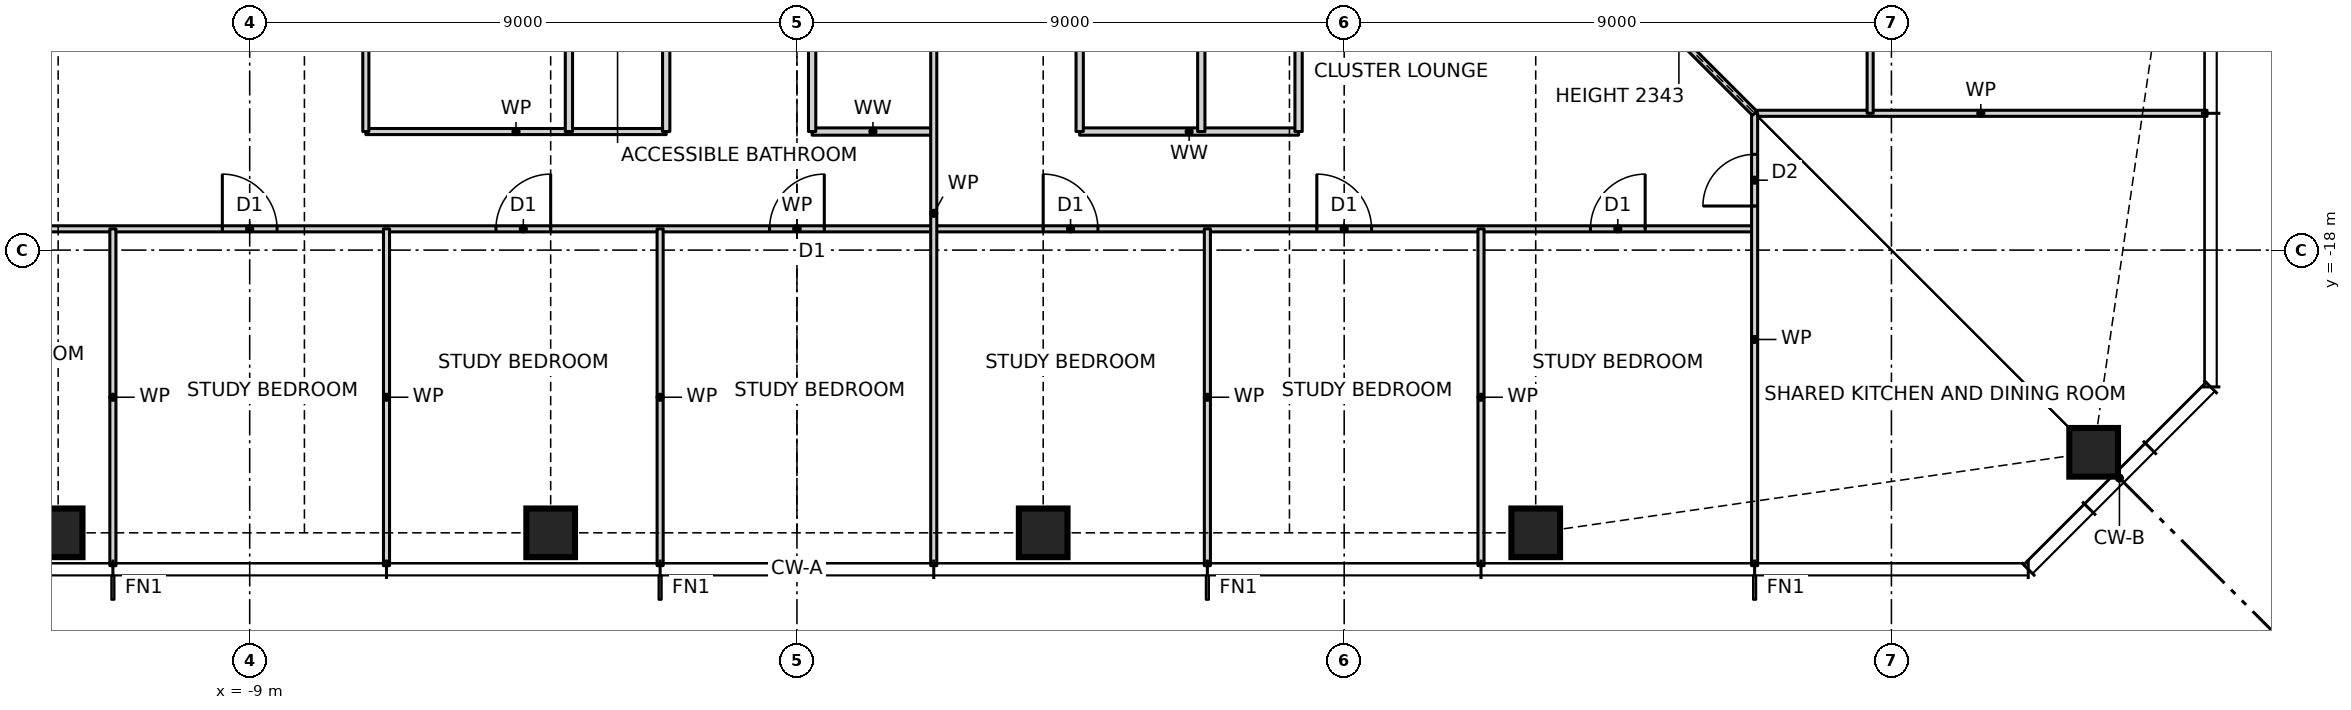
"""IFC4 building model, lengths in metres.
Left out: names, types, materials, properties, quantities, classifications, styles, units other than length and angle.
Written with IfcOpenShell. Run it as: python <this file> out.ifc"""

import sys

from ifc_helpers import new_model, si_unit, direction, frame, frame_2d, origin, origin_2d, place, context, subcontext, project, spatial, rectangle, hollow_rectangle, extrude, element, fill, save


model = new_model("IFC4")
c1 = context("Model", 3, precision=1e-05, world=origin(), true_north=direction((0.0, 1.0)))
c2 = subcontext(c1, "Body", "Model", "MODEL_VIEW")
j1 = project(units=[si_unit("LENGTHUNIT", "METRE"), si_unit("PLANEANGLEUNIT", "RADIAN")], contexts=[c1])
p1 = place(None, origin())
s1 = spatial("IfcSite", under=j1, at=p1, CompositionType="ELEMENT")
p2 = place(p1, origin())
s2 = spatial("IfcBuilding", under=s1, at=p2, CompositionType="ELEMENT")
p3 = place(p2, frame((0.0, 0.0, 64.0)))
s3 = spatial("IfcBuildingStorey", under=s2, at=p3, CompositionType="ELEMENT", Elevation=64.0)
for number, where, z_axis, x_axis in (
    (1, (-12.15, -22.65, 0.0), (0.0, 0.0, 1.0), (1.0, 0.0, 0.0)),
    (2, (-4.05, -22.65, 0.0), (0.0, 0.0, 1.0), (1.0, 0.0, 0.0)),
    (3, (4.05, -22.65, 0.0), (0.0, 0.0, 1.0), (1.0, 0.0, 0.0)),
    (4, (12.15, -22.65, 0.0), (0.0, 0.0, 1.0), (1.0, 0.0, 0.0)),
    (5, (21.326, -21.326, 0.0), (0.0, 0.0, 1.0), (1.0, 0.0, 0.0)),
):
    element("IfcColumn", number, at=place(p3, frame(where, z_axis=z_axis, x_axis=x_axis)), inside=s3, PredefinedType="COLUMN", context=c2, shape_type="SweptSolid", body=[
        extrude(hollow_rectangle(XDim=0.8, YDim=0.8, WallThickness=0.09, at=origin_2d()), origin(), (0.0, 0.0, 1.0), 3.5),
    ])
p4 = place(p3, frame((-15.75, -17.65, 0.0), z_axis=(0.0, 0.0, 1.0), x_axis=(1.0, 0.0, 0.0)))
e6 = element("IfcWall", 6, at=p4, inside=s3, PredefinedType="PARTITIONING", context=c2, shape_type="SweptSolid", body=[
    extrude(rectangle(XDim=31.5, YDim=0.1, at=frame_2d((15.75, 0.0))), origin(), (0.0, 0.0, 1.0), 3.27),
])
p5 = place(p4, frame((1.8, 0.0, 0.0)))
e7 = element("IfcOpeningElement", 7, at=p5, cuts=e6, PredefinedType="OPENING", context=c2, shape_type="SweptSolid", body=[
    extrude(rectangle(XDim=0.9, YDim=2.1, at=frame_2d((0.45, 1.05))), frame((0.0, 0.06, 0.0), z_axis=(0.0, -1.0, 0.0), x_axis=(1.0, 0.0, 0.0)), (0.0, 0.0, 1.0), 0.12),
])
p6 = place(p4, frame((6.3, 0.0, 0.0)))
e8 = element("IfcOpeningElement", 8, at=p6, cuts=e6, PredefinedType="OPENING", context=c2, shape_type="SweptSolid", body=[
    extrude(rectangle(XDim=0.9, YDim=2.1, at=frame_2d((0.45, 1.05))), frame((0.0, 0.06, 0.0), z_axis=(0.0, -1.0, 0.0), x_axis=(1.0, 0.0, 0.0)), (0.0, 0.0, 1.0), 0.12),
])
p7 = place(p4, frame((10.8, 0.0, 0.0)))
e9 = element("IfcOpeningElement", 9, at=p7, cuts=e6, PredefinedType="OPENING", context=c2, shape_type="SweptSolid", body=[
    extrude(rectangle(XDim=0.9, YDim=2.1, at=frame_2d((0.45, 1.05))), frame((0.0, 0.06, 0.0), z_axis=(0.0, -1.0, 0.0), x_axis=(1.0, 0.0, 0.0)), (0.0, 0.0, 1.0), 0.12),
])
p8 = place(p4, frame((15.3, 0.0, 0.0)))
e10 = element("IfcOpeningElement", 10, at=p8, cuts=e6, PredefinedType="OPENING", context=c2, shape_type="SweptSolid", body=[
    extrude(rectangle(XDim=0.9, YDim=2.1, at=frame_2d((0.45, 1.05))), frame((0.0, 0.06, 0.0), z_axis=(0.0, -1.0, 0.0), x_axis=(1.0, 0.0, 0.0)), (0.0, 0.0, 1.0), 0.12),
])
p9 = place(p4, frame((19.8, 0.0, 0.0)))
e11 = element("IfcOpeningElement", 11, at=p9, cuts=e6, PredefinedType="OPENING", context=c2, shape_type="SweptSolid", body=[
    extrude(rectangle(XDim=0.9, YDim=2.1, at=frame_2d((0.45, 1.05))), frame((0.0, 0.06, 0.0), z_axis=(0.0, -1.0, 0.0), x_axis=(1.0, 0.0, 0.0)), (0.0, 0.0, 1.0), 0.12),
])
p10 = place(p4, frame((24.3, 0.0, 0.0)))
e12 = element("IfcOpeningElement", 12, at=p10, cuts=e6, PredefinedType="OPENING", context=c2, shape_type="SweptSolid", body=[
    extrude(rectangle(XDim=0.9, YDim=2.1, at=frame_2d((0.45, 1.05))), frame((0.0, 0.06, 0.0), z_axis=(0.0, -1.0, 0.0), x_axis=(1.0, 0.0, 0.0)), (0.0, 0.0, 1.0), 0.12),
])
p11 = place(p4, frame((28.8, 0.0, 0.0)))
e13 = element("IfcOpeningElement", 13, at=p11, cuts=e6, PredefinedType="OPENING", context=c2, shape_type="SweptSolid", body=[
    extrude(rectangle(XDim=0.9, YDim=2.1, at=frame_2d((0.45, 1.05))), frame((0.0, 0.06, 0.0), z_axis=(0.0, -1.0, 0.0), x_axis=(1.0, 0.0, 0.0)), (0.0, 0.0, 1.0), 0.12),
])
p12 = place(p3, frame((-7.09, -16.05, 0.0), z_axis=(0.0, 0.0, 1.0), x_axis=(1.0, 0.0, 0.0)))
e14 = element("IfcWall", 14, at=p12, inside=s3, PredefinedType="PARTITIONING", context=c2, shape_type="SweptSolid", body=[
    extrude(rectangle(XDim=4.94, YDim=0.1, at=frame_2d((2.47, 0.0))), origin(), (0.0, 0.0, 1.0), 3.27),
])
p13 = place(p3, frame((0.25, -16.05, 0.0), z_axis=(0.0, 0.0, 1.0), x_axis=(1.0, 0.0, 0.0)))
e15 = element("IfcWall", 15, at=p13, inside=s3, PredefinedType="PARTITIONING", context=c2, shape_type="SweptSolid", body=[
    extrude(rectangle(XDim=2.0, YDim=0.12, at=frame_2d((1.0, 0.0))), origin(), (0.0, 0.0, 1.0), 3.27),
])
p14 = place(p3, frame((4.65, -16.05, 0.0), z_axis=(0.0, 0.0, 1.0), x_axis=(1.0, 0.0, 0.0)))
e16 = element("IfcWall", 16, at=p14, inside=s3, PredefinedType="PARTITIONING", context=c2, shape_type="SweptSolid", body=[
    extrude(rectangle(XDim=3.6, YDim=0.12, at=frame_2d((1.8, 0.0))), origin(), (0.0, 0.0, 1.0), 3.27),
])
p15 = place(p3, frame((15.75, -15.75, 0.0), z_axis=(0.0, 0.0, 1.0), x_axis=(1.0, 0.0, 0.0)))
e17 = element("IfcWall", 17, at=p15, inside=s3, PredefinedType="PARTITIONING", context=c2, shape_type="SweptSolid", body=[
    extrude(rectangle(XDim=7.44, YDim=0.1, at=frame_2d((3.72, 0.0))), origin(), (0.0, 0.0, 1.0), 3.27),
])
p16 = place(p3, frame((-15.75, -15.75, 0.0), z_axis=(0.0, 0.0, 1.0), x_axis=(0.707106781187, 0.707106781187, 0.0)))
e18 = element("IfcWall", 18, at=p16, inside=s3, PredefinedType="PARTITIONING", context=c2, shape_type="SweptSolid", body=[
    extrude(rectangle(XDim=5.869, YDim=0.1, at=frame_2d((2.935, 0.0))), origin(), (0.0, 0.0, 1.0), 2.343),
])
p17 = place(p3, frame((17.65, -15.75, 0.0), z_axis=(0.0, 0.0, 1.0), x_axis=(0.0, 1.0, 0.0)))
e19 = element("IfcWall", 19, at=p17, inside=s3, PredefinedType="PARTITIONING", context=c2, shape_type="SweptSolid", body=[
    extrude(rectangle(XDim=27.0, YDim=0.1, at=frame_2d((13.5, 0.0))), origin(), (0.0, 0.0, 1.0), 3.27),
])
p18 = place(p17, frame((1.8, 0.0, 0.0)))
e20 = element("IfcOpeningElement", 20, at=p18, cuts=e19, PredefinedType="OPENING", context=c2, shape_type="SweptSolid", body=[
    extrude(rectangle(XDim=0.9, YDim=2.1, at=frame_2d((0.45, 1.05))), frame((0.0, 0.06, 0.0), z_axis=(0.0, -1.0, 0.0), x_axis=(1.0, 0.0, 0.0)), (0.0, 0.0, 1.0), 0.12),
])
p19 = place(p17, frame((6.3, 0.0, 0.0)))
e21 = element("IfcOpeningElement", 21, at=p19, cuts=e19, PredefinedType="OPENING", context=c2, shape_type="SweptSolid", body=[
    extrude(rectangle(XDim=0.9, YDim=2.1, at=frame_2d((0.45, 1.05))), frame((0.0, 0.06, 0.0), z_axis=(0.0, -1.0, 0.0), x_axis=(1.0, 0.0, 0.0)), (0.0, 0.0, 1.0), 0.12),
])
p20 = place(p17, frame((10.8, 0.0, 0.0)))
e22 = element("IfcOpeningElement", 22, at=p20, cuts=e19, PredefinedType="OPENING", context=c2, shape_type="SweptSolid", body=[
    extrude(rectangle(XDim=0.9, YDim=2.1, at=frame_2d((0.45, 1.05))), frame((0.0, 0.06, 0.0), z_axis=(0.0, -1.0, 0.0), x_axis=(1.0, 0.0, 0.0)), (0.0, 0.0, 1.0), 0.12),
])
p21 = place(p17, frame((15.3, 0.0, 0.0)))
e23 = element("IfcOpeningElement", 23, at=p21, cuts=e19, PredefinedType="OPENING", context=c2, shape_type="SweptSolid", body=[
    extrude(rectangle(XDim=0.9, YDim=2.1, at=frame_2d((0.45, 1.05))), frame((0.0, 0.06, 0.0), z_axis=(0.0, -1.0, 0.0), x_axis=(1.0, 0.0, 0.0)), (0.0, 0.0, 1.0), 0.12),
])
p22 = place(p17, frame((19.8, 0.0, 0.0)))
e24 = element("IfcOpeningElement", 24, at=p22, cuts=e19, PredefinedType="OPENING", context=c2, shape_type="SweptSolid", body=[
    extrude(rectangle(XDim=0.9, YDim=2.1, at=frame_2d((0.45, 1.05))), frame((0.0, 0.06, 0.0), z_axis=(0.0, -1.0, 0.0), x_axis=(1.0, 0.0, 0.0)), (0.0, 0.0, 1.0), 0.12),
])
p23 = place(p17, frame((24.3, 0.0, 0.0)))
e25 = element("IfcOpeningElement", 25, at=p23, cuts=e19, PredefinedType="OPENING", context=c2, shape_type="SweptSolid", body=[
    extrude(rectangle(XDim=0.9, YDim=2.1, at=frame_2d((0.45, 1.05))), frame((0.0, 0.06, 0.0), z_axis=(0.0, -1.0, 0.0), x_axis=(1.0, 0.0, 0.0)), (0.0, 0.0, 1.0), 0.12),
])
p24 = place(p3, frame((15.75, -23.19, 0.0), z_axis=(0.0, 0.0, 1.0), x_axis=(0.0, 1.0, 0.0)))
e26 = element("IfcWall", 26, at=p24, inside=s3, PredefinedType="PARTITIONING", context=c2, shape_type="SweptSolid", body=[
    extrude(rectangle(XDim=7.44, YDim=0.1, at=frame_2d((3.72, 0.0))), origin(), (0.0, 0.0, 1.0), 3.27),
])
p25 = place(p24, frame((5.915, 0.0, 0.0)))
e27 = element("IfcOpeningElement", 27, at=p25, cuts=e26, PredefinedType="OPENING", context=c2, shape_type="SweptSolid", body=[
    extrude(rectangle(XDim=0.85, YDim=2.1, at=frame_2d((0.425, 1.05))), frame((0.0, 0.06, 0.0), z_axis=(0.0, -1.0, 0.0), x_axis=(1.0, 0.0, 0.0)), (0.0, 0.0, 1.0), 0.12),
])
p26 = place(p3, frame((11.25, -23.19, 0.0), z_axis=(0.0, 0.0, 1.0), x_axis=(0.0, 1.0, 0.0)))
e28 = element("IfcWall", 28, at=p26, inside=s3, PredefinedType="PARTITIONING", context=c2, shape_type="SweptSolid", body=[
    extrude(rectangle(XDim=5.54, YDim=0.1, at=frame_2d((2.77, 0.0))), origin(), (0.0, 0.0, 1.0), 3.27),
])
p27 = place(p3, frame((8.25, -16.05, 0.0), z_axis=(0.0, 0.0, 1.0), x_axis=(0.0, 1.0, 0.0)))
e29 = element("IfcWall", 29, at=p27, inside=s3, PredefinedType="PARTITIONING", context=c2, shape_type="SweptSolid", body=[
    extrude(rectangle(XDim=4.45, YDim=0.12, at=frame_2d((2.225, 0.0))), origin(), (0.0, 0.0, 1.0), 3.27),
])
p28 = place(p27, frame((1.8, 0.0, 0.0)))
e30 = element("IfcOpeningElement", 30, at=p28, cuts=e29, PredefinedType="OPENING", context=c2, shape_type="SweptSolid", body=[
    extrude(rectangle(XDim=0.85, YDim=2.1, at=frame_2d((0.425, 1.05))), frame((0.0, 0.07, 0.0), z_axis=(0.0, -1.0, 0.0), x_axis=(1.0, 0.0, 0.0)), (0.0, 0.0, 1.0), 0.14),
])
p29 = place(p3, frame((6.75, -23.19, 0.0), z_axis=(0.0, 0.0, 1.0), x_axis=(0.0, 1.0, 0.0)))
e31 = element("IfcWall", 31, at=p29, inside=s3, PredefinedType="PARTITIONING", context=c2, shape_type="SweptSolid", body=[
    extrude(rectangle(XDim=5.54, YDim=0.1, at=frame_2d((2.77, 0.0))), origin(), (0.0, 0.0, 1.0), 3.27),
])
p30 = place(p3, frame((6.65, -16.05, 0.0), z_axis=(0.0, 0.0, 1.0), x_axis=(0.0, 1.0, 0.0)))
e32 = element("IfcWall", 32, at=p30, inside=s3, PredefinedType="PARTITIONING", context=c2, shape_type="SweptSolid", body=[
    extrude(rectangle(XDim=4.45, YDim=0.12, at=frame_2d((2.225, 0.0))), origin(), (0.0, 0.0, 1.0), 3.27),
])
p31 = place(p3, frame((4.65, -16.05, 0.0), z_axis=(0.0, 0.0, 1.0), x_axis=(0.0, 1.0, 0.0)))
e33 = element("IfcWall", 33, at=p31, inside=s3, PredefinedType="PARTITIONING", context=c2, shape_type="SweptSolid", body=[
    extrude(rectangle(XDim=4.45, YDim=0.12, at=frame_2d((2.225, 0.0))), origin(), (0.0, 0.0, 1.0), 3.27),
])
p32 = place(p31, frame((1.8, 0.0, 0.0)))
e34 = element("IfcOpeningElement", 34, at=p32, cuts=e33, PredefinedType="OPENING", context=c2, shape_type="SweptSolid", body=[
    extrude(rectangle(XDim=0.85, YDim=2.1, at=frame_2d((0.425, 1.05))), frame((0.0, 0.07, 0.0), z_axis=(0.0, -1.0, 0.0), x_axis=(1.0, 0.0, 0.0)), (0.0, 0.0, 1.0), 0.14),
])
p33 = place(p3, frame((2.25, -23.19, 0.0), z_axis=(0.0, 0.0, 1.0), x_axis=(0.0, 1.0, 0.0)))
e35 = element("IfcWall", 35, at=p33, inside=s3, PredefinedType="PARTITIONING", context=c2, shape_type="SweptSolid", body=[
    extrude(rectangle(XDim=11.59, YDim=0.1, at=frame_2d((5.795, 0.0))), origin(), (0.0, 0.0, 1.0), 3.27),
])
p34 = place(p3, frame((0.25, -16.05, 0.0), z_axis=(0.0, 0.0, 1.0), x_axis=(0.0, 1.0, 0.0)))
e36 = element("IfcWall", 36, at=p34, inside=s3, PredefinedType="PARTITIONING", context=c2, shape_type="SweptSolid", body=[
    extrude(rectangle(XDim=4.45, YDim=0.12, at=frame_2d((2.225, 0.0))), origin(), (0.0, 0.0, 1.0), 3.27),
])
p35 = place(p34, frame((1.8, 0.0, 0.0)))
e37 = element("IfcOpeningElement", 37, at=p35, cuts=e36, PredefinedType="OPENING", context=c2, shape_type="SweptSolid", body=[
    extrude(rectangle(XDim=0.85, YDim=2.1, at=frame_2d((0.425, 1.05))), frame((0.0, 0.07, 0.0), z_axis=(0.0, -1.0, 0.0), x_axis=(1.0, 0.0, 0.0)), (0.0, 0.0, 1.0), 0.14),
])
p36 = place(p3, frame((-2.15, -16.05, 0.0), z_axis=(0.0, 0.0, 1.0), x_axis=(0.0, 1.0, 0.0)))
e38 = element("IfcWall", 38, at=p36, inside=s3, PredefinedType="PARTITIONING", context=c2, shape_type="SweptSolid", body=[
    extrude(rectangle(XDim=4.45, YDim=0.12, at=frame_2d((2.225, 0.0))), origin(), (0.0, 0.0, 1.0), 3.27),
])
p37 = place(p36, frame((1.8, 0.0, 0.0)))
e39 = element("IfcOpeningElement", 39, at=p37, cuts=e38, PredefinedType="OPENING", context=c2, shape_type="SweptSolid", body=[
    extrude(rectangle(XDim=0.85, YDim=2.1, at=frame_2d((0.425, 1.05))), frame((0.0, 0.07, 0.0), z_axis=(0.0, -1.0, 0.0), x_axis=(1.0, 0.0, 0.0)), (0.0, 0.0, 1.0), 0.14),
])
p38 = place(p3, frame((-2.25, -23.19, 0.0), z_axis=(0.0, 0.0, 1.0), x_axis=(0.0, 1.0, 0.0)))
e40 = element("IfcWall", 40, at=p38, inside=s3, PredefinedType="PARTITIONING", context=c2, shape_type="SweptSolid", body=[
    extrude(rectangle(XDim=5.54, YDim=0.1, at=frame_2d((2.77, 0.0))), origin(), (0.0, 0.0, 1.0), 3.27),
])
p39 = place(p3, frame((-3.75, -16.05, 0.0), z_axis=(0.0, 0.0, 1.0), x_axis=(0.0, 1.0, 0.0)))
e41 = element("IfcWall", 41, at=p39, inside=s3, PredefinedType="PARTITIONING", context=c2, shape_type="SweptSolid", body=[
    extrude(rectangle(XDim=4.45, YDim=0.12, at=frame_2d((2.225, 0.0))), origin(), (0.0, 0.0, 1.0), 3.27),
])
p40 = place(p3, frame((-6.75, -23.19, 0.0), z_axis=(0.0, 0.0, 1.0), x_axis=(0.0, 1.0, 0.0)))
e42 = element("IfcWall", 42, at=p40, inside=s3, PredefinedType="PARTITIONING", context=c2, shape_type="SweptSolid", body=[
    extrude(rectangle(XDim=5.54, YDim=0.1, at=frame_2d((2.77, 0.0))), origin(), (0.0, 0.0, 1.0), 3.27),
])
p41 = place(p3, frame((-7.09, -16.05, 0.0), z_axis=(0.0, 0.0, 1.0), x_axis=(0.0, 1.0, 0.0)))
e43 = element("IfcWall", 43, at=p41, inside=s3, PredefinedType="PARTITIONING", context=c2, shape_type="SweptSolid", body=[
    extrude(rectangle(XDim=4.45, YDim=0.1, at=frame_2d((2.225, 0.0))), origin(), (0.0, 0.0, 1.0), 3.27),
])
p42 = place(p41, frame((1.8, 0.0, 0.0)))
e44 = element("IfcOpeningElement", 44, at=p42, cuts=e43, PredefinedType="OPENING", context=c2, shape_type="SweptSolid", body=[
    extrude(rectangle(XDim=0.85, YDim=2.1, at=frame_2d((0.425, 1.05))), frame((0.0, 0.06, 0.0), z_axis=(0.0, -1.0, 0.0), x_axis=(1.0, 0.0, 0.0)), (0.0, 0.0, 1.0), 0.12),
])
p43 = place(p3, frame((-11.25, -23.19, 0.0), z_axis=(0.0, 0.0, 1.0), x_axis=(0.0, 1.0, 0.0)))
e45 = element("IfcWall", 45, at=p43, inside=s3, PredefinedType="PARTITIONING", context=c2, shape_type="SweptSolid", body=[
    extrude(rectangle(XDim=5.54, YDim=0.1, at=frame_2d((2.77, 0.0))), origin(), (0.0, 0.0, 1.0), 3.27),
])
p44 = place(p3, frame((15.75, -15.75, 0.0), z_axis=(0.0, 0.0, 1.0), x_axis=(-0.707106781187, 0.707106781187, 0.0)))
e46 = element("IfcWall", 46, at=p44, inside=s3, PredefinedType="PARTITIONING", context=c2, shape_type="SweptSolid", body=[
    extrude(rectangle(XDim=5.869, YDim=0.1, at=frame_2d((2.935, 0.0))), origin(), (0.0, 0.0, 1.0), 2.343),
])
p45 = place(p6, origin())
e47 = element("IfcDoor", 47, at=p45, inside=s3, OperationType="SINGLE_SWING_LEFT", PredefinedType="DOOR", context=c2, shape_type="SweptSolid", body=[
    extrude(rectangle(XDim=0.9, YDim=2.1, at=frame_2d((0.45, 1.05))), frame((0.0, 0.025, 0.0), z_axis=(0.0, -1.0, 0.0), x_axis=(1.0, 0.0, 0.0)), (0.0, 0.0, 1.0), 0.05),
])
fill(e8, e47)
p46 = place(p7, origin())
e48 = element("IfcDoor", 48, at=p46, inside=s3, OperationType="SINGLE_SWING_RIGHT", PredefinedType="DOOR", context=c2, shape_type="SweptSolid", body=[
    extrude(rectangle(XDim=0.9, YDim=2.1, at=frame_2d((0.45, 1.05))), frame((0.0, 0.025, 0.0), z_axis=(0.0, -1.0, 0.0), x_axis=(1.0, 0.0, 0.0)), (0.0, 0.0, 1.0), 0.05),
])
fill(e9, e48)
p47 = place(p8, origin())
e49 = element("IfcDoor", 49, at=p47, inside=s3, OperationType="SINGLE_SWING_RIGHT", PredefinedType="DOOR", context=c2, shape_type="SweptSolid", body=[
    extrude(rectangle(XDim=0.9, YDim=2.1, at=frame_2d((0.45, 1.05))), frame((0.0, 0.025, 0.0), z_axis=(0.0, -1.0, 0.0), x_axis=(1.0, 0.0, 0.0)), (0.0, 0.0, 1.0), 0.05),
])
fill(e10, e49)
p48 = place(p9, origin())
e50 = element("IfcDoor", 50, at=p48, inside=s3, OperationType="SINGLE_SWING_LEFT", PredefinedType="DOOR", context=c2, shape_type="SweptSolid", body=[
    extrude(rectangle(XDim=0.9, YDim=2.1, at=frame_2d((0.45, 1.05))), frame((0.0, 0.025, 0.0), z_axis=(0.0, -1.0, 0.0), x_axis=(1.0, 0.0, 0.0)), (0.0, 0.0, 1.0), 0.05),
])
fill(e11, e50)
p49 = place(p10, origin())
e51 = element("IfcDoor", 51, at=p49, inside=s3, OperationType="SINGLE_SWING_LEFT", PredefinedType="DOOR", context=c2, shape_type="SweptSolid", body=[
    extrude(rectangle(XDim=0.9, YDim=2.1, at=frame_2d((0.45, 1.05))), frame((0.0, 0.025, 0.0), z_axis=(0.0, -1.0, 0.0), x_axis=(1.0, 0.0, 0.0)), (0.0, 0.0, 1.0), 0.05),
])
fill(e12, e51)
p50 = place(p11, origin())
e52 = element("IfcDoor", 52, at=p50, inside=s3, OperationType="SINGLE_SWING_RIGHT", PredefinedType="DOOR", context=c2, shape_type="SweptSolid", body=[
    extrude(rectangle(XDim=0.9, YDim=2.1, at=frame_2d((0.45, 1.05))), frame((0.0, 0.025, 0.0), z_axis=(0.0, -1.0, 0.0), x_axis=(1.0, 0.0, 0.0)), (0.0, 0.0, 1.0), 0.05),
])
fill(e13, e52)
p51 = place(p25, origin())
e53 = element("IfcDoor", 53, at=p51, inside=s3, OperationType="SINGLE_SWING_LEFT", PredefinedType="DOOR", context=c2, shape_type="SweptSolid", body=[
    extrude(rectangle(XDim=0.85, YDim=2.1, at=frame_2d((0.425, 1.05))), frame((0.0, 0.025, 0.0), z_axis=(0.0, -1.0, 0.0), x_axis=(1.0, 0.0, 0.0)), (0.0, 0.0, 1.0), 0.05),
])
fill(e27, e53)
save(model, sys.argv[1])
